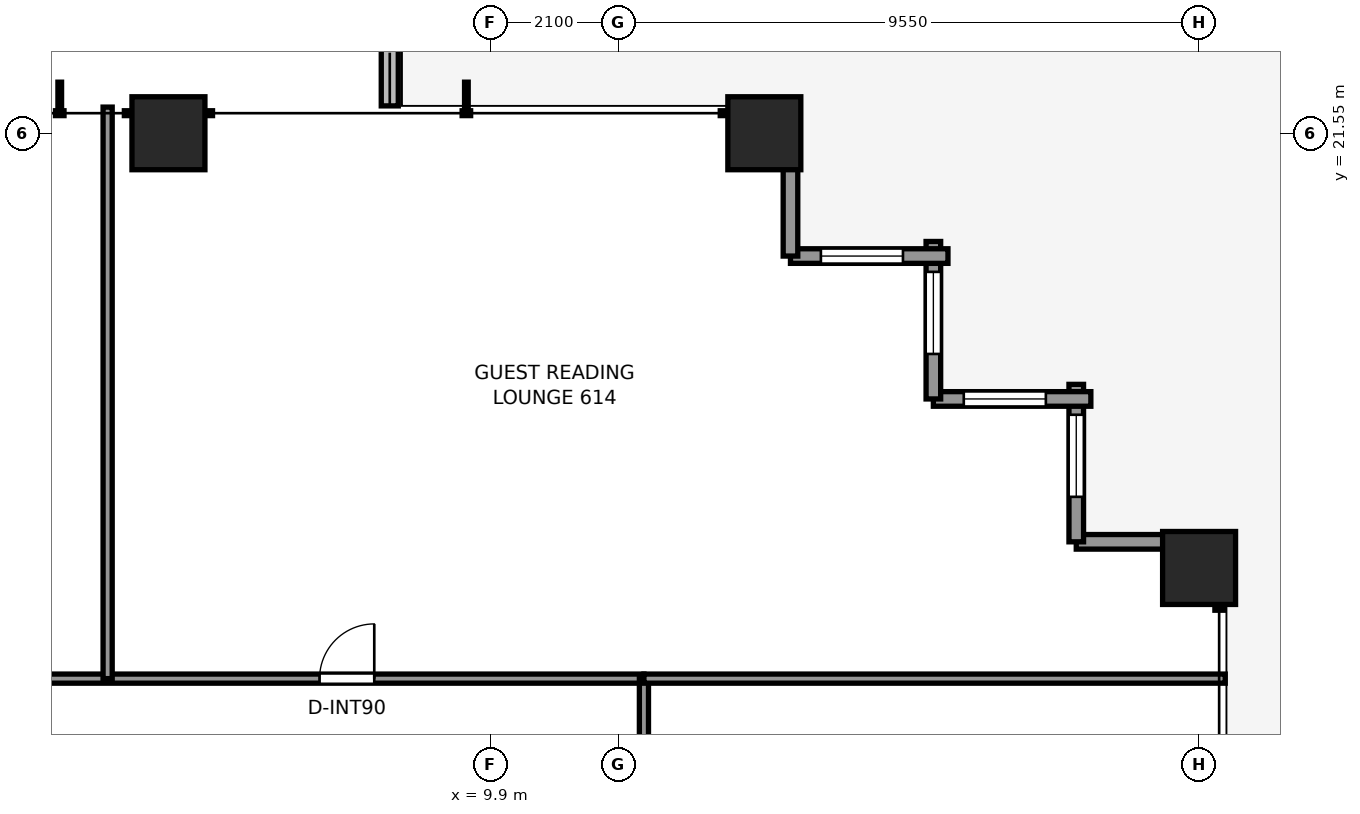
"""IFC4 building model, lengths in metres.
Left out: names, types, materials, properties, quantities, classifications, styles, units other than length and angle.
Written with IfcOpenShell. Run it as: python <this file> out.ifc"""

import sys

from ifc_helpers import new_model, si_unit, direction, frame, frame_2d, origin, origin_2d, place, context, subcontext, project, spatial, rectangle, extrude, element, fill, save


model = new_model("IFC4")
c1 = context("Model", 3, precision=1e-05, world=origin(), true_north=direction((0.0, 1.0)))
c2 = subcontext(c1, "Body", "Model", "MODEL_VIEW")
j1 = project(units=[si_unit("LENGTHUNIT", "METRE"), si_unit("PLANEANGLEUNIT", "RADIAN")], contexts=[c1])
p1 = place(None, origin())
s1 = spatial("IfcSite", under=j1, at=p1, CompositionType="ELEMENT")
p2 = place(p1, origin())
s2 = spatial("IfcBuilding", under=s1, at=p2, CompositionType="ELEMENT")
p3 = place(p2, frame((0.0, 0.0, 23.8)))
s3 = spatial("IfcBuildingStorey", under=s2, at=p3, CompositionType="ELEMENT", Elevation=23.8)
for number, where, z_axis, x_axis in (
    (1, (4.6, 21.55, 0.0), (0.0, 0.0, 1.0), (1.0, 0.0, 0.0)),
    (2, (14.4, 21.55, 0.0), (0.0, 0.0, 1.0), (1.0, 0.0, 0.0)),
    (3, (21.55, 14.4, 0.0), (0.0, 0.0, 1.0), (1.0, 0.0, 0.0)),
):
    element("IfcColumn", number, at=place(p3, frame(where, z_axis=z_axis, x_axis=x_axis)), inside=s3, PredefinedType="COLUMN", context=c2, shape_type="SweptSolid", body=[
        extrude(rectangle(XDim=1.2, YDim=1.2, at=origin_2d()), origin(), (0.0, 0.0, 1.0), 3.3),
    ])
p4 = place(p3, frame((8.24, 22.0, -0.06), z_axis=(0.0, 0.0, 1.0), x_axis=(0.0, 1.0, 0.0)))
e4 = element("IfcWall", 4, at=p4, inside=s3, PredefinedType="PARAPET", context=c2, shape_type="SweptSolid", body=[
    extrude(rectangle(XDim=2.34, YDim=0.28, at=frame_2d((1.17, 0.0))), origin(), (0.0, 0.0, 1.0), 0.42),
])
p5 = place(p3, frame((19.53, 14.83, 0.0), z_axis=(0.0, 0.0, 1.0), x_axis=(1.0, 0.0, 0.0)))
e5 = element("IfcWall", 5, at=p5, inside=s3, PredefinedType="STANDARD", context=c2, shape_type="SweptSolid", body=[
    extrude(rectangle(XDim=2.59, YDim=0.24, at=frame_2d((1.295, 0.0))), origin(), (0.0, 0.0, 1.0), 2.439),
])
p6 = place(p3, frame((19.53, 17.42, 0.0), z_axis=(0.0, 0.0, 1.0), x_axis=(0.0, -1.0, 0.0)))
e6 = element("IfcWall", 6, at=p6, inside=s3, PredefinedType="STANDARD", context=c2, shape_type="SweptSolid", body=[
    extrude(rectangle(XDim=2.59, YDim=0.24, at=frame_2d((1.295, 0.0))), origin(), (0.0, 0.0, 1.0), 2.439),
])
p7 = place(p6, frame((0.5, 0.0, 0.65)))
e7 = element("IfcOpeningElement", 7, at=p7, cuts=e6, PredefinedType="OPENING", context=c2, shape_type="SweptSolid", body=[
    extrude(rectangle(XDim=1.35, YDim=1.55, at=frame_2d((0.675, 0.775))), frame((0.0, 0.13, 0.0), z_axis=(0.0, -1.0, 0.0), x_axis=(1.0, 0.0, 0.0)), (0.0, 0.0, 1.0), 0.26),
])
p8 = place(p3, frame((17.18, 17.18, 0.0), z_axis=(0.0, 0.0, 1.0), x_axis=(1.0, 0.0, 0.0)))
e8 = element("IfcWall", 8, at=p8, inside=s3, PredefinedType="STANDARD", context=c2, shape_type="SweptSolid", body=[
    extrude(rectangle(XDim=2.59, YDim=0.24, at=frame_2d((1.295, 0.0))), origin(), (0.0, 0.0, 1.0), 2.439),
])
p9 = place(p8, frame((0.5, 0.0, 0.65)))
e9 = element("IfcOpeningElement", 9, at=p9, cuts=e8, PredefinedType="OPENING", context=c2, shape_type="SweptSolid", body=[
    extrude(rectangle(XDim=1.35, YDim=1.55, at=frame_2d((0.675, 0.775))), frame((0.0, 0.13, 0.0), z_axis=(0.0, -1.0, 0.0), x_axis=(1.0, 0.0, 0.0)), (0.0, 0.0, 1.0), 0.26),
])
p10 = place(p3, frame((17.18, 19.77, 0.0), z_axis=(0.0, 0.0, 1.0), x_axis=(0.0, -1.0, 0.0)))
e10 = element("IfcWall", 10, at=p10, inside=s3, PredefinedType="STANDARD", context=c2, shape_type="SweptSolid", body=[
    extrude(rectangle(XDim=2.59, YDim=0.24, at=frame_2d((1.295, 0.0))), origin(), (0.0, 0.0, 1.0), 2.439),
])
p11 = place(p10, frame((0.5, 0.0, 0.65)))
e11 = element("IfcOpeningElement", 11, at=p11, cuts=e10, PredefinedType="OPENING", context=c2, shape_type="SweptSolid", body=[
    extrude(rectangle(XDim=1.35, YDim=1.55, at=frame_2d((0.675, 0.775))), frame((0.0, 0.13, 0.0), z_axis=(0.0, -1.0, 0.0), x_axis=(1.0, 0.0, 0.0)), (0.0, 0.0, 1.0), 0.26),
])
p12 = place(p3, frame((14.83, 19.53, 0.0), z_axis=(0.0, 0.0, 1.0), x_axis=(1.0, 0.0, 0.0)))
e12 = element("IfcWall", 12, at=p12, inside=s3, PredefinedType="STANDARD", context=c2, shape_type="SweptSolid", body=[
    extrude(rectangle(XDim=2.59, YDim=0.24, at=frame_2d((1.295, 0.0))), origin(), (0.0, 0.0, 1.0), 2.439),
])
p13 = place(p12, frame((0.5, 0.0, 0.65)))
e13 = element("IfcOpeningElement", 13, at=p13, cuts=e12, PredefinedType="OPENING", context=c2, shape_type="SweptSolid", body=[
    extrude(rectangle(XDim=1.35, YDim=1.55, at=frame_2d((0.675, 0.775))), frame((0.0, 0.13, 0.0), z_axis=(0.0, -1.0, 0.0), x_axis=(1.0, 0.0, 0.0)), (0.0, 0.0, 1.0), 0.26),
])
p14 = place(p3, frame((14.83, 22.12, 0.0), z_axis=(0.0, 0.0, 1.0), x_axis=(0.0, -1.0, 0.0)))
e14 = element("IfcWall", 14, at=p14, inside=s3, PredefinedType="STANDARD", context=c2, shape_type="SweptSolid", body=[
    extrude(rectangle(XDim=2.59, YDim=0.24, at=frame_2d((1.295, 0.0))), origin(), (0.0, 0.0, 1.0), 2.439),
])
p15 = place(p3, frame((-12.26, 12.58, 0.0), z_axis=(0.0, 0.0, 1.0), x_axis=(1.0, 0.0, 0.0)))
e15 = element("IfcWall", 15, at=p15, inside=s3, PredefinedType="PARTITIONING", context=c2, shape_type="SweptSolid", body=[
    extrude(rectangle(XDim=24.68, YDim=0.15, at=frame_2d((12.34, 0.0))), origin(), (0.0, 0.0, 1.0), 2.272),
])
p16 = place(p15, frame((3.444, 0.0, 0.0)))
e16 = element("IfcOpeningElement", 16, at=p16, cuts=e15, PredefinedType="OPENING", context=c2, shape_type="SweptSolid", body=[
    extrude(rectangle(XDim=0.9, YDim=2.06, at=frame_2d((0.45, 1.03))), frame((0.0, 0.085, 0.0), z_axis=(0.0, -1.0, 0.0), x_axis=(1.0, 0.0, 0.0)), (0.0, 0.0, 1.0), 0.17),
])
p17 = place(p15, frame((9.78, 0.0, 0.0)))
e17 = element("IfcOpeningElement", 17, at=p17, cuts=e15, PredefinedType="OPENING", context=c2, shape_type="SweptSolid", body=[
    extrude(rectangle(XDim=0.9, YDim=2.06, at=frame_2d((0.45, 1.03))), frame((0.0, 0.085, 0.0), z_axis=(0.0, -1.0, 0.0), x_axis=(1.0, 0.0, 0.0)), (0.0, 0.0, 1.0), 0.17),
])
p18 = place(p15, frame((19.345, 0.0, 0.0)))
e18 = element("IfcOpeningElement", 18, at=p18, cuts=e15, PredefinedType="OPENING", context=c2, shape_type="SweptSolid", body=[
    extrude(rectangle(XDim=0.9, YDim=2.06, at=frame_2d((0.45, 1.03))), frame((0.0, 0.085, 0.0), z_axis=(0.0, -1.0, 0.0), x_axis=(1.0, 0.0, 0.0)), (0.0, 0.0, 1.0), 0.17),
])
p19 = place(p3, frame((12.42, -12.26, 0.0), z_axis=(0.0, 0.0, 1.0), x_axis=(0.0, 1.0, 0.0)))
e19 = element("IfcWall", 19, at=p19, inside=s3, PredefinedType="PARTITIONING", context=c2, shape_type="SweptSolid", body=[
    extrude(rectangle(XDim=24.84, YDim=0.15, at=frame_2d((12.42, 0.0))), origin(), (0.0, 0.0, 1.0), 2.272),
])
p20 = place(p19, frame((4.099, 0.0, 0.0)))
e20 = element("IfcOpeningElement", 20, at=p20, cuts=e19, PredefinedType="OPENING", context=c2, shape_type="SweptSolid", body=[
    extrude(rectangle(XDim=0.95, YDim=2.06, at=frame_2d((0.475, 1.03))), frame((0.0, 0.085, 0.0), z_axis=(0.0, -1.0, 0.0), x_axis=(1.0, 0.0, 0.0)), (0.0, 0.0, 1.0), 0.17),
])
p21 = place(p19, frame((13.577, 0.0, 0.0)))
e21 = element("IfcOpeningElement", 21, at=p21, cuts=e19, PredefinedType="OPENING", context=c2, shape_type="SweptSolid", body=[
    extrude(rectangle(XDim=0.95, YDim=2.06, at=frame_2d((0.475, 1.03))), frame((0.0, 0.085, 0.0), z_axis=(0.0, -1.0, 0.0), x_axis=(1.0, 0.0, 0.0)), (0.0, 0.0, 1.0), 0.17),
])
p22 = place(p19, frame((19.692, 0.0, 0.0)))
e22 = element("IfcOpeningElement", 22, at=p22, cuts=e19, PredefinedType="OPENING", context=c2, shape_type="SweptSolid", body=[
    extrude(rectangle(XDim=0.95, YDim=2.06, at=frame_2d((0.475, 1.03))), frame((0.0, 0.085, 0.0), z_axis=(0.0, -1.0, 0.0), x_axis=(1.0, 0.0, 0.0)), (0.0, 0.0, 1.0), 0.17),
])
p23 = place(p3, frame((12.42, 12.58, 0.0), z_axis=(0.0, 0.0, 1.0), x_axis=(1.0, 0.0, 0.0)))
e23 = element("IfcWall", 23, at=p23, inside=s3, PredefinedType="PARTITIONING", context=c2, shape_type="SweptSolid", body=[
    extrude(rectangle(XDim=9.56, YDim=0.15, at=frame_2d((4.78, 0.0))), origin(), (0.0, 0.0, 1.0), 2.272),
])
p24 = place(p3, frame((3.6, 12.58, 0.0), z_axis=(0.0, 0.0, 1.0), x_axis=(0.0, 1.0, 0.0)))
e24 = element("IfcWall", 24, at=p24, inside=s3, PredefinedType="PARTITIONING", context=c2, shape_type="SweptSolid", body=[
    extrude(rectangle(XDim=9.4, YDim=0.15, at=frame_2d((4.7, 0.0))), origin(), (0.0, 0.0, 1.0), 2.429),
])
p25 = place(p7, origin())
e25 = element("IfcWindow", 25, at=p25, inside=s3, PartitioningType="SINGLE_PANEL", PredefinedType="WINDOW", context=c2, shape_type="SweptSolid", body=[
    extrude(rectangle(XDim=1.35, YDim=1.55, at=frame_2d((0.675, 0.775))), frame((0.0, 0.03, 0.0), z_axis=(0.0, -1.0, 0.0), x_axis=(1.0, 0.0, 0.0)), (0.0, 0.0, 1.0), 0.06),
])
fill(e7, e25)
p26 = place(p9, origin())
e26 = element("IfcWindow", 26, at=p26, inside=s3, PartitioningType="SINGLE_PANEL", PredefinedType="WINDOW", context=c2, shape_type="SweptSolid", body=[
    extrude(rectangle(XDim=1.35, YDim=1.55, at=frame_2d((0.675, 0.775))), frame((0.0, 0.03, 0.0), z_axis=(0.0, -1.0, 0.0), x_axis=(1.0, 0.0, 0.0)), (0.0, 0.0, 1.0), 0.06),
])
fill(e9, e26)
p27 = place(p11, origin())
e27 = element("IfcWindow", 27, at=p27, inside=s3, PartitioningType="SINGLE_PANEL", PredefinedType="WINDOW", context=c2, shape_type="SweptSolid", body=[
    extrude(rectangle(XDim=1.35, YDim=1.55, at=frame_2d((0.675, 0.775))), frame((0.0, 0.03, 0.0), z_axis=(0.0, -1.0, 0.0), x_axis=(1.0, 0.0, 0.0)), (0.0, 0.0, 1.0), 0.06),
])
fill(e11, e27)
p28 = place(p13, origin())
e28 = element("IfcWindow", 28, at=p28, inside=s3, PartitioningType="SINGLE_PANEL", PredefinedType="WINDOW", context=c2, shape_type="SweptSolid", body=[
    extrude(rectangle(XDim=1.35, YDim=1.55, at=frame_2d((0.675, 0.775))), frame((0.0, 0.03, 0.0), z_axis=(0.0, -1.0, 0.0), x_axis=(1.0, 0.0, 0.0)), (0.0, 0.0, 1.0), 0.06),
])
fill(e13, e28)
p29 = place(p18, origin())
e29 = element("IfcDoor", 29, at=p29, inside=s3, OperationType="SINGLE_SWING_RIGHT", PredefinedType="DOOR", context=c2, shape_type="SweptSolid", body=[
    extrude(rectangle(XDim=0.9, YDim=2.06, at=frame_2d((0.45, 1.03))), frame((0.0, 0.025, 0.0), z_axis=(0.0, -1.0, 0.0), x_axis=(1.0, 0.0, 0.0)), (0.0, 0.0, 1.0), 0.05),
])
fill(e18, e29)
save(model, sys.argv[1])
